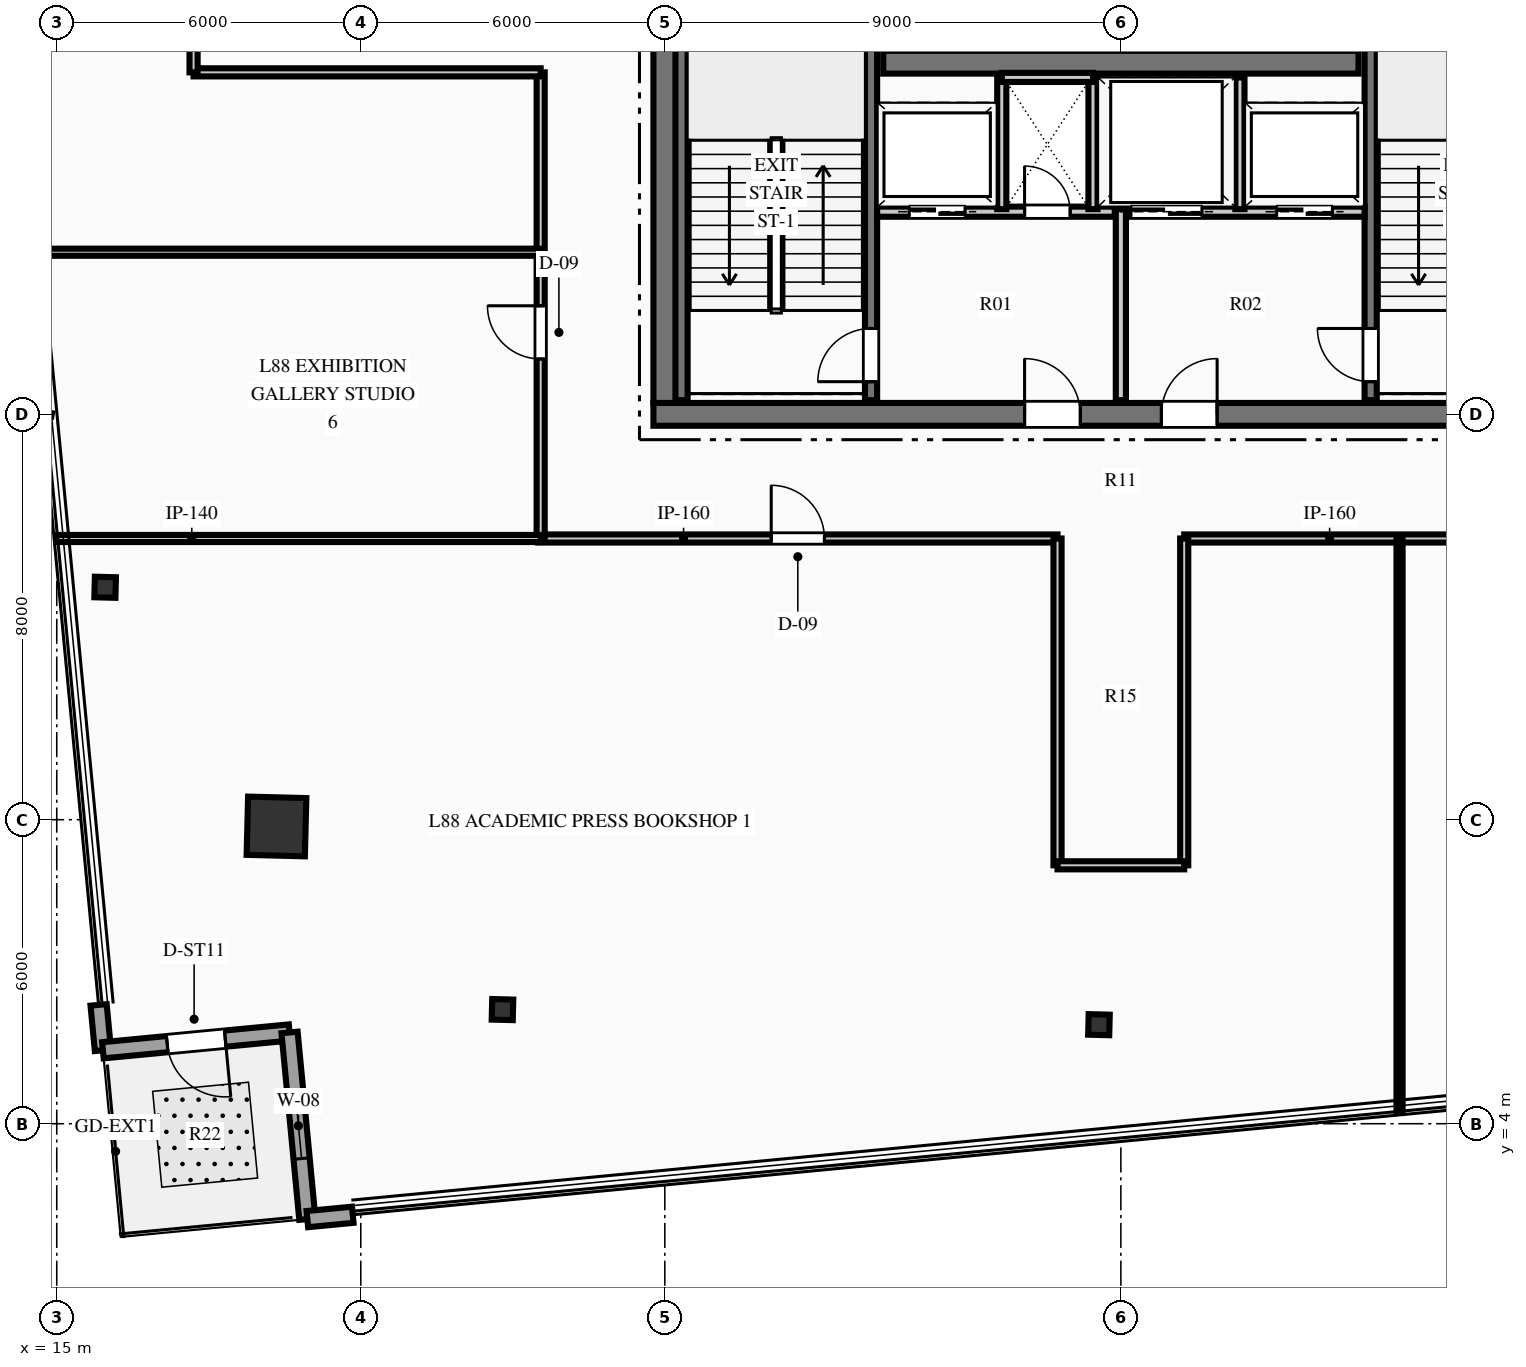
"""IFC4 building model, lengths in metres.
Left out: names, types, materials, properties, quantities, classifications, styles, units other than length and angle.
Written with IfcOpenShell. Run it as: python <this file> out.ifc"""

import sys

from ifc_helpers import new_model, si_unit, direction, frame, frame_2d, origin, origin_2d, place, context, subcontext, project, spatial, rectangle, hollow_rectangle, i_section, extrude, element, fill, save


model = new_model("IFC4")
c1 = context("Model", 3, precision=1e-05, world=origin(), true_north=direction((0.0, 1.0)))
c2 = subcontext(c1, "Body", "Model", "MODEL_VIEW")
j1 = project(units=[si_unit("LENGTHUNIT", "METRE"), si_unit("PLANEANGLEUNIT", "RADIAN")], contexts=[c1])
p1 = place(None, origin())
s1 = spatial("IfcSite", under=j1, at=p1, CompositionType="ELEMENT")
p2 = place(p1, origin())
s2 = spatial("IfcBuilding", under=s1, at=p2, CompositionType="ELEMENT")
p3 = place(p2, frame((0.0, 0.0, 347.7)))
s3 = spatial("IfcBuildingStorey", under=s2, at=p3, CompositionType="ELEMENT", Elevation=347.7)
p4 = place(p3, frame((26.775, 18.0, 0.0), z_axis=(0.0, 0.0, 1.0), x_axis=(1.0, 0.0, 0.0)))
e1 = element("IfcWall", 1, at=p4, inside=s3, PredefinedType="SHEAR", context=c2, shape_type="SweptSolid", body=[
    extrude(rectangle(XDim=18.45, YDim=0.45, at=frame_2d((9.225, 0.0))), origin(), (0.0, 0.0, 1.0), 4.5),
])
p5 = place(p4, frame((7.325, 0.0, 0.0)))
e2 = element("IfcOpeningElement", 2, at=p5, cuts=e1, PredefinedType="OPENING", context=c2, shape_type="SweptSolid", body=[
    extrude(rectangle(XDim=1.1, YDim=2.15, at=frame_2d((0.55, 1.075))), frame((0.0, 0.235, 0.0), z_axis=(0.0, -1.0, 0.0), x_axis=(1.0, 0.0, 0.0)), (0.0, 0.0, 1.0), 0.47),
])
p6 = place(p4, frame((10.025, 0.0, 0.0)))
e3 = element("IfcOpeningElement", 3, at=p6, cuts=e1, PredefinedType="OPENING", context=c2, shape_type="SweptSolid", body=[
    extrude(rectangle(XDim=1.1, YDim=2.15, at=frame_2d((0.55, 1.075))), frame((0.0, 0.235, 0.0), z_axis=(0.0, -1.0, 0.0), x_axis=(1.0, 0.0, 0.0)), (0.0, 0.0, 1.0), 0.47),
])
p7 = place(p3, frame((27.0, 18.225, 0.0), z_axis=(0.0, 0.0, 1.0), x_axis=(0.0, 1.0, 0.0)))
e4 = element("IfcWall", 4, at=p7, inside=s3, PredefinedType="SHEAR", context=c2, shape_type="SweptSolid", body=[
    extrude(rectangle(XDim=15.55, YDim=0.45, at=frame_2d((7.775, 0.0))), origin(), (0.0, 0.0, 1.0), 4.5),
])
p8 = place(p7, frame((10.015, 0.0, 0.0)))
e5 = element("IfcOpeningElement", 5, at=p8, cuts=e4, PredefinedType="OPENING", context=c2, shape_type="SweptSolid", body=[
    extrude(rectangle(XDim=1.4, YDim=2.2, at=frame_2d((0.7, 1.1))), frame((0.0, 0.235, 0.0), z_axis=(0.0, -1.0, 0.0), x_axis=(1.0, 0.0, 0.0)), (0.0, 0.0, 1.0), 0.47),
])
p9 = place(p3, frame((31.31, 24.95, 0.0), z_axis=(0.0, 0.0, 1.0), x_axis=(1.0, 0.0, 0.0)))
e6 = element("IfcWall", 6, at=p9, inside=s3, PredefinedType="SHEAR", context=c2, shape_type="SweptSolid", body=[
    extrude(rectangle(XDim=9.38, YDim=0.45, at=frame_2d((4.69, 0.0))), origin(), (0.0, 0.0, 1.0), 4.5),
])
p10 = place(p3, frame((31.07, 18.28, 0.0), z_axis=(0.0, 0.0, 1.0), x_axis=(0.0, 1.0, 0.0)))
e7 = element("IfcWall", 7, at=p10, inside=s3, PredefinedType="SHEAR", context=c2, shape_type="SweptSolid", body=[
    extrude(rectangle(XDim=8.26, YDim=0.24, at=frame_2d((4.13, 0.0))), origin(), (0.0, 0.0, 1.0), 4.5),
])
p11 = place(p10, frame((0.365, 0.0, 0.0)))
e8 = element("IfcOpeningElement", 8, at=p11, cuts=e7, PredefinedType="OPENING", context=c2, shape_type="SweptSolid", body=[
    extrude(rectangle(XDim=1.05, YDim=2.15, at=frame_2d((0.525, 1.075))), frame((0.0, 0.13, 0.0), z_axis=(0.0, -1.0, 0.0), x_axis=(1.0, 0.0, 0.0)), (0.0, 0.0, 1.0), 0.26),
])
p12 = place(p3, frame((27.33, 18.28, 0.0), z_axis=(0.0, 0.0, 1.0), x_axis=(0.0, 1.0, 0.0)))
e9 = element("IfcWall", 9, at=p12, inside=s3, PredefinedType="SHEAR", context=c2, shape_type="SweptSolid", body=[
    extrude(rectangle(XDim=8.26, YDim=0.24, at=frame_2d((4.13, 0.0))), origin(), (0.0, 0.0, 1.0), 4.5),
])
p13 = place(p3, frame((40.93, 18.28, 0.0), z_axis=(0.0, 0.0, 1.0), x_axis=(0.0, 1.0, 0.0)))
e10 = element("IfcWall", 10, at=p13, inside=s3, PredefinedType="SHEAR", context=c2, shape_type="SweptSolid", body=[
    extrude(rectangle(XDim=8.26, YDim=0.24, at=frame_2d((4.13, 0.0))), origin(), (0.0, 0.0, 1.0), 4.5),
])
p14 = place(p13, frame((0.365, 0.0, 0.0)))
e11 = element("IfcOpeningElement", 11, at=p14, cuts=e10, PredefinedType="OPENING", context=c2, shape_type="SweptSolid", body=[
    extrude(rectangle(XDim=1.05, YDim=2.15, at=frame_2d((0.525, 1.075))), frame((0.0, 0.13, 0.0), z_axis=(0.0, -1.0, 0.0), x_axis=(1.0, 0.0, 0.0)), (0.0, 0.0, 1.0), 0.26),
])
p15 = place(p3, frame((19.336, 9.866, 0.0), z_axis=(0.0, 0.0, 1.0), x_axis=(0.025304572866, 0.999679788028, 0.0)))
e12 = element("IfcColumn", 12, at=p15, inside=s3, PredefinedType="COLUMN", context=c2, shape_type="SweptSolid", body=[
    extrude(hollow_rectangle(XDim=1.15, YDim=1.15, WallThickness=0.05, at=origin_2d()), origin(), (0.0, 0.0, 1.0), 4.5),
])
for number, where, z_axis, x_axis in (
    (13, (15.955, 14.588, 0.0), (0.0, 0.0, 1.0), (0.025, 1.0, 0.0)),
    (14, (23.796, 6.252, 0.0), (0.0, 0.0, 1.0), (0.025, 1.0, 0.0)),
    (15, (35.568, 5.955, 0.0), (0.0, 0.0, 1.0), (0.025, 1.0, 0.0)),
):
    element("IfcColumn", number, at=place(p3, frame(where, z_axis=z_axis, x_axis=x_axis)), inside=s3, PredefinedType="COLUMN", context=c2, shape_type="SweptSolid", body=[
        extrude(i_section(OverallWidth=0.406, OverallDepth=0.416, WebThickness=0.03, FlangeThickness=0.048, at=origin_2d()), origin(), (0.0, 0.0, 1.0), 4.5),
    ])
p16 = place(p3, frame((15.911, 5.449, 0.0), z_axis=(0.0, 0.0, 1.0), x_axis=(-0.094962739077, 0.995480827634, 0.0)))
e16 = element("IfcWall", 16, at=p16, inside=s3, PredefinedType="STANDARD", context=c2, shape_type="SweptSolid", body=[
    extrude(rectangle(XDim=0.9, YDim=0.32, at=frame_2d((0.45, 0.0))), origin(), (0.0, 0.0, 1.0), 4.1),
])
p17 = place(p3, frame((19.594, 5.801, 0.0), z_axis=(0.0, 0.0, 1.0), x_axis=(-0.995481522985, -0.094955449528, 0.0)))
e17 = element("IfcWall", 17, at=p17, inside=s3, PredefinedType="STANDARD", context=c2, shape_type="SweptSolid", body=[
    extrude(rectangle(XDim=3.7, YDim=0.32, at=frame_2d((1.85, 0.0))), origin(), (0.0, 0.0, 1.0), 4.1),
])
p18 = place(p17, frame((1.275, 0.0, 0.0)))
e18 = element("IfcOpeningElement", 18, at=p18, cuts=e17, PredefinedType="OPENING", context=c2, shape_type="SweptSolid", body=[
    extrude(rectangle(XDim=1.15, YDim=2.2, at=frame_2d((0.575, 1.1))), frame((0.0, 0.17, 0.0), z_axis=(0.0, -1.0, 0.0), x_axis=(1.0, 0.0, 0.0)), (0.0, 0.0, 1.0), 0.34),
])
p19 = place(p3, frame((19.946, 2.117, 0.0), z_axis=(0.0, 0.0, 1.0), x_axis=(-0.095014599714, 0.995475879086, 0.0)))
e19 = element("IfcWall", 19, at=p19, inside=s3, PredefinedType="STANDARD", context=c2, shape_type="SweptSolid", body=[
    extrude(rectangle(XDim=3.7, YDim=0.32, at=frame_2d((1.85, 0.0))), origin(), (0.0, 0.0, 1.0), 4.1),
])
p20 = place(p19, frame((1.2, 0.0, 0.85)))
e20 = element("IfcOpeningElement", 20, at=p20, cuts=e19, PredefinedType="OPENING", context=c2, shape_type="SweptSolid", body=[
    extrude(rectangle(XDim=1.3, YDim=1.9, at=frame_2d((0.65, 0.95))), frame((0.0, 0.17, 0.0), z_axis=(0.0, -1.0, 0.0), x_axis=(1.0, 0.0, 0.0)), (0.0, 0.0, 1.0), 0.34),
])
p21 = place(p3, frame((20.842, 2.203, 0.0), z_axis=(0.0, 0.0, 1.0), x_axis=(-0.995455142934, -0.095231604026, 0.0)))
e21 = element("IfcWall", 21, at=p21, inside=s3, PredefinedType="STANDARD", context=c2, shape_type="SweptSolid", body=[
    extrude(rectangle(XDim=0.9, YDim=0.32, at=frame_2d((0.45, 0.0))), origin(), (0.0, 0.0, 1.0), 4.1),
])
p22 = place(p3, frame((36.0, 18.28, 0.0), z_axis=(0.0, 0.0, 1.0), x_axis=(0.0, 1.0, 0.0)))
e22 = element("IfcWall", 22, at=p22, inside=s3, PredefinedType="PARTITIONING", context=c2, shape_type="SweptSolid", body=[
    extrude(rectangle(XDim=3.77, YDim=0.2, at=frame_2d((1.885, 0.0))), origin(), (0.0, 0.0, 1.0), 4.1),
])
p23 = place(p3, frame((31.19, 22.0, 0.0), z_axis=(0.0, 0.0, 1.0), x_axis=(1.0, 0.0, 0.0)))
e23 = element("IfcWall", 23, at=p23, inside=s3, PredefinedType="PARTITIONING", context=c2, shape_type="SweptSolid", body=[
    extrude(rectangle(XDim=4.69, YDim=0.2, at=frame_2d((2.345, 0.0))), origin(), (0.0, 0.0, 1.0), 4.1),
])
p24 = place(p23, frame((2.91, 0.0, 0.0)))
e24 = element("IfcOpeningElement", 24, at=p24, cuts=e23, PredefinedType="OPENING", context=c2, shape_type="SweptSolid", body=[
    extrude(rectangle(XDim=0.9, YDim=2.15, at=frame_2d((0.45, 1.075))), frame((0.0, 0.11, 0.0), z_axis=(0.0, -1.0, 0.0), x_axis=(1.0, 0.0, 0.0)), (0.0, 0.0, 1.0), 0.22),
])
p25 = place(p23, frame((0.635, 0.0, 0.0)))
e25 = element("IfcOpeningElement", 25, at=p25, cuts=e23, PredefinedType="OPENING", context=c2, shape_type="SweptSolid", body=[
    extrude(rectangle(XDim=1.1, YDim=2.15, at=frame_2d((0.55, 1.075))), frame((0.0, 0.11, 0.0), z_axis=(0.0, -1.0, 0.0), x_axis=(1.0, 0.0, 0.0)), (0.0, 0.0, 1.0), 0.22),
])
p26 = place(p3, frame((36.12, 22.0, 0.0), z_axis=(0.0, 0.0, 1.0), x_axis=(1.0, 0.0, 0.0)))
e26 = element("IfcWall", 26, at=p26, inside=s3, PredefinedType="PARTITIONING", context=c2, shape_type="SweptSolid", body=[
    extrude(rectangle(XDim=4.69, YDim=0.2, at=frame_2d((2.345, 0.0))), origin(), (0.0, 0.0, 1.0), 4.1),
])
p27 = place(p26, frame((2.955, 0.0, 0.0)))
e27 = element("IfcOpeningElement", 27, at=p27, cuts=e26, PredefinedType="OPENING", context=c2, shape_type="SweptSolid", body=[
    extrude(rectangle(XDim=1.1, YDim=2.15, at=frame_2d((0.55, 1.075))), frame((0.0, 0.11, 0.0), z_axis=(0.0, -1.0, 0.0), x_axis=(1.0, 0.0, 0.0)), (0.0, 0.0, 1.0), 0.22),
])
p28 = place(p26, frame((0.08, 0.0, 0.0)))
e28 = element("IfcOpeningElement", 28, at=p28, cuts=e26, PredefinedType="OPENING", context=c2, shape_type="SweptSolid", body=[
    extrude(rectangle(XDim=1.4, YDim=2.2, at=frame_2d((0.7, 1.1))), frame((0.0, 0.11, 0.0), z_axis=(0.0, -1.0, 0.0), x_axis=(1.0, 0.0, 0.0)), (0.0, 0.0, 1.0), 0.22),
])
for number, where, z_axis, x_axis in (
    (29, (33.65, 22.05, 0.0), (0.0, 0.0, 1.0), (0.0, 1.0, 0.0)),
    (30, (35.45, 22.05, 0.0), (0.0, 0.0, 1.0), (0.0, 1.0, 0.0)),
):
    element("IfcWall", number, at=place(p3, frame(where, z_axis=z_axis, x_axis=x_axis)), inside=s3, PredefinedType="PARTITIONING", context=c2, shape_type="SweptSolid", body=[
        extrude(rectangle(XDim=2.6, YDim=0.18, at=frame_2d((1.3, 0.0))), origin(), (0.0, 0.0, 1.0), 4.1),
    ])
p29 = place(p3, frame((33.65, 24.65, 0.0), z_axis=(0.0, 0.0, 1.0), x_axis=(1.0, 0.0, 0.0)))
e31 = element("IfcWall", 31, at=p29, inside=s3, PredefinedType="PARTITIONING", context=c2, shape_type="SweptSolid", body=[
    extrude(rectangle(XDim=1.8, YDim=0.18, at=frame_2d((0.9, 0.0))), origin(), (0.0, 0.0, 1.0), 4.1),
])
p30 = place(p3, frame((38.35, 22.05, 0.0), z_axis=(0.0, 0.0, 1.0), x_axis=(0.0, 1.0, 0.0)))
e32 = element("IfcWall", 32, at=p30, inside=s3, PredefinedType="PARTITIONING", context=c2, shape_type="SweptSolid", body=[
    extrude(rectangle(XDim=2.6, YDim=0.18, at=frame_2d((1.3, 0.0))), origin(), (0.0, 0.0, 1.0), 4.1),
])
p31 = place(p3, frame((24.5, 15.55, 0.0), z_axis=(0.0, 0.0, 1.0), x_axis=(1.0, 0.0, 0.0)))
e33 = element("IfcWall", 33, at=p31, inside=s3, PredefinedType="PARTITIONING", context=c2, shape_type="SweptSolid", body=[
    extrude(rectangle(XDim=10.25, YDim=0.16, at=frame_2d((5.125, 0.0))), origin(), (0.0, 0.0, 1.0), 4.1),
])
p32 = place(p31, frame((4.6, 0.0, 0.0)))
e34 = element("IfcOpeningElement", 34, at=p32, cuts=e33, PredefinedType="OPENING", context=c2, shape_type="SweptSolid", body=[
    extrude(rectangle(XDim=1.05, YDim=2.15, at=frame_2d((0.525, 1.075))), frame((0.0, 0.09, 0.0), z_axis=(0.0, -1.0, 0.0), x_axis=(1.0, 0.0, 0.0)), (0.0, 0.0, 1.0), 0.18),
])
p33 = place(p3, frame((37.25, 15.55, 0.0), z_axis=(0.0, 0.0, 1.0), x_axis=(1.0, 0.0, 0.0)))
e35 = element("IfcWall", 35, at=p33, inside=s3, PredefinedType="PARTITIONING", context=c2, shape_type="SweptSolid", body=[
    extrude(rectangle(XDim=10.25, YDim=0.16, at=frame_2d((5.125, 0.0))), origin(), (0.0, 0.0, 1.0), 4.1),
])
p34 = place(p33, frame((5.419, 0.0, 0.0)))
e36 = element("IfcOpeningElement", 36, at=p34, cuts=e35, PredefinedType="OPENING", context=c2, shape_type="SweptSolid", body=[
    extrude(rectangle(XDim=1.05, YDim=2.15, at=frame_2d((0.525, 1.075))), frame((0.0, 0.09, 0.0), z_axis=(0.0, -1.0, 0.0), x_axis=(1.0, 0.0, 0.0)), (0.0, 0.0, 1.0), 0.18),
])
p35 = place(p3, frame((24.55, 15.55, 0.0), z_axis=(0.0, 0.0, 1.0), x_axis=(0.0, 1.0, 0.0)))
e37 = element("IfcWall", 37, at=p35, inside=s3, PredefinedType="PARTITIONING", context=c2, shape_type="SweptSolid", body=[
    extrude(rectangle(XDim=9.2, YDim=0.16, at=frame_2d((4.6, 0.0))), origin(), (0.0, 0.0, 1.0), 4.1),
])
p36 = place(p35, frame((3.543, 0.0, 0.0)))
e38 = element("IfcOpeningElement", 38, at=p36, cuts=e37, PredefinedType="OPENING", context=c2, shape_type="SweptSolid", body=[
    extrude(rectangle(XDim=1.05, YDim=2.15, at=frame_2d((0.525, 1.075))), frame((0.0, 0.09, 0.0), z_axis=(0.0, -1.0, 0.0), x_axis=(1.0, 0.0, 0.0)), (0.0, 0.0, 1.0), 0.18),
])
for number, where, z_axis, x_axis in (
    (39, (34.75, 9.1, 0.0), (0.0, 0.0, 1.0), (0.0, 1.0, 0.0)),
    (40, (37.25, 9.1, 0.0), (0.0, 0.0, 1.0), (0.0, 1.0, 0.0)),
):
    element("IfcWall", number, at=place(p3, frame(where, z_axis=z_axis, x_axis=x_axis)), inside=s3, PredefinedType="PARTITIONING", context=c2, shape_type="SweptSolid", body=[
        extrude(rectangle(XDim=6.45, YDim=0.16, at=frame_2d((3.225, 0.0))), origin(), (0.0, 0.0, 1.0), 4.1),
    ])
p37 = place(p3, frame((34.75, 9.1, 0.0), z_axis=(0.0, 0.0, 1.0), x_axis=(1.0, 0.0, 0.0)))
e41 = element("IfcWall", 41, at=p37, inside=s3, PredefinedType="PARTITIONING", context=c2, shape_type="SweptSolid", body=[
    extrude(rectangle(XDim=2.5, YDim=0.16, at=frame_2d((1.25, 0.0))), origin(), (0.0, 0.0, 1.0), 4.1),
])
p38 = place(p3, frame((17.7, 24.75, 0.0), z_axis=(0.0, 0.0, 1.0), x_axis=(1.0, 0.0, 0.0)))
e42 = element("IfcWall", 42, at=p38, inside=s3, PredefinedType="PARTITIONING", context=c2, shape_type="SweptSolid", body=[
    extrude(rectangle(XDim=6.85, YDim=0.16, at=frame_2d((3.425, 0.0))), origin(), (0.0, 0.0, 1.0), 4.1),
])
p39 = place(p3, frame((17.7, 24.75, 0.0), z_axis=(0.0, 0.0, 1.0), x_axis=(0.0, 1.0, 0.0)))
e43 = element("IfcWall", 43, at=p39, inside=s3, PredefinedType="PARTITIONING", context=c2, shape_type="SweptSolid", body=[
    extrude(rectangle(XDim=2.5, YDim=0.16, at=frame_2d((1.25, 0.0))), origin(), (0.0, 0.0, 1.0), 4.1),
])
p40 = place(p3, frame((14.988, 15.55, 0.0), z_axis=(0.0, 0.0, 1.0), x_axis=(1.0, 0.0, 0.0)))
e44 = element("IfcWall", 44, at=p40, inside=s3, PredefinedType="PARTITIONING", context=c2, shape_type="SweptSolid", body=[
    extrude(rectangle(XDim=9.562, YDim=0.14, at=frame_2d((4.781, 0.0))), origin(), (0.0, 0.0, 1.0), 3.478),
])
p41 = place(p3, frame((41.5, 4.214, 0.0), z_axis=(0.0, 0.0, 1.0), x_axis=(0.0, 1.0, 0.0)))
e45 = element("IfcWall", 45, at=p41, inside=s3, PredefinedType="PARTITIONING", context=c2, shape_type="SweptSolid", body=[
    extrude(rectangle(XDim=11.336, YDim=0.12, at=frame_2d((5.668, 0.0))), origin(), (0.0, 0.0, 1.0), 4.1),
])
p42 = place(p3, frame((14.448, 21.2, 0.0), z_axis=(0.0, 0.0, 1.0), x_axis=(1.0, 0.0, 0.0)))
e46 = element("IfcWall", 46, at=p42, inside=s3, PredefinedType="PARTITIONING", context=c2, shape_type="SweptSolid", body=[
    extrude(rectangle(XDim=10.102, YDim=0.14, at=frame_2d((5.051, 0.0))), origin(), (0.0, 0.0, 1.0), 4.1),
])
p43 = place(p18, origin())
e47 = element("IfcDoor", 47, at=p43, inside=s3, OperationType="SINGLE_SWING_LEFT", PredefinedType="DOOR", context=c2, shape_type="SweptSolid", body=[
    extrude(rectangle(XDim=1.15, YDim=2.2, at=frame_2d((0.575, 1.1))), frame((0.0, 0.025, 0.0), z_axis=(0.0, -1.0, 0.0), x_axis=(1.0, 0.0, 0.0)), (0.0, 0.0, 1.0), 0.05),
])
fill(e18, e47)
p44 = place(p20, origin())
e48 = element("IfcWindow", 48, at=p44, inside=s3, PartitioningType="SINGLE_PANEL", PredefinedType="WINDOW", context=c2, shape_type="SweptSolid", body=[
    extrude(rectangle(XDim=1.3, YDim=1.9, at=frame_2d((0.65, 0.95))), frame((0.0, 0.03, 0.0), z_axis=(0.0, -1.0, 0.0), x_axis=(1.0, 0.0, 0.0)), (0.0, 0.0, 1.0), 0.06),
])
fill(e20, e48)
p45 = place(p11, origin())
e49 = element("IfcDoor", 49, at=p45, inside=s3, OperationType="SINGLE_SWING_LEFT", PredefinedType="DOOR", context=c2, shape_type="SweptSolid", body=[
    extrude(rectangle(XDim=1.05, YDim=2.15, at=frame_2d((0.525, 1.075))), frame((0.0, 0.025, 0.0), z_axis=(0.0, -1.0, 0.0), x_axis=(1.0, 0.0, 0.0)), (0.0, 0.0, 1.0), 0.05),
])
fill(e8, e49)
p46 = place(p14, origin())
e50 = element("IfcDoor", 50, at=p46, inside=s3, OperationType="SINGLE_SWING_RIGHT", PredefinedType="DOOR", context=c2, shape_type="SweptSolid", body=[
    extrude(rectangle(XDim=1.05, YDim=2.15, at=frame_2d((0.525, 1.075))), frame((0.0, 0.025, 0.0), z_axis=(0.0, -1.0, 0.0), x_axis=(1.0, 0.0, 0.0)), (0.0, 0.0, 1.0), 0.05),
])
fill(e11, e50)
p47 = place(p5, origin())
e51 = element("IfcDoor", 51, at=p47, inside=s3, OperationType="SINGLE_SWING_LEFT", PredefinedType="DOOR", context=c2, shape_type="SweptSolid", body=[
    extrude(rectangle(XDim=1.1, YDim=2.15, at=frame_2d((0.55, 1.075))), frame((0.0, 0.025, 0.0), z_axis=(0.0, -1.0, 0.0), x_axis=(1.0, 0.0, 0.0)), (0.0, 0.0, 1.0), 0.05),
])
fill(e2, e51)
p48 = place(p6, origin())
e52 = element("IfcDoor", 52, at=p48, inside=s3, OperationType="SINGLE_SWING_RIGHT", PredefinedType="DOOR", context=c2, shape_type="SweptSolid", body=[
    extrude(rectangle(XDim=1.1, YDim=2.15, at=frame_2d((0.55, 1.075))), frame((0.0, 0.025, 0.0), z_axis=(0.0, -1.0, 0.0), x_axis=(1.0, 0.0, 0.0)), (0.0, 0.0, 1.0), 0.05),
])
fill(e3, e52)
p49 = place(p24, origin())
e53 = element("IfcDoor", 53, at=p49, inside=s3, OperationType="SINGLE_SWING_LEFT", PredefinedType="DOOR", context=c2, shape_type="SweptSolid", body=[
    extrude(rectangle(XDim=0.9, YDim=2.15, at=frame_2d((0.45, 1.075))), frame((0.0, 0.025, 0.0), z_axis=(0.0, -1.0, 0.0), x_axis=(1.0, 0.0, 0.0)), (0.0, 0.0, 1.0), 0.05),
])
fill(e24, e53)
p50 = place(p32, origin())
e54 = element("IfcDoor", 54, at=p50, inside=s3, OperationType="SINGLE_SWING_LEFT", PredefinedType="DOOR", context=c2, shape_type="SweptSolid", body=[
    extrude(rectangle(XDim=1.05, YDim=2.15, at=frame_2d((0.525, 1.075))), frame((0.0, 0.025, 0.0), z_axis=(0.0, -1.0, 0.0), x_axis=(1.0, 0.0, 0.0)), (0.0, 0.0, 1.0), 0.05),
])
fill(e34, e54)
p51 = place(p36, origin())
e55 = element("IfcDoor", 55, at=p51, inside=s3, OperationType="SINGLE_SWING_RIGHT", PredefinedType="DOOR", context=c2, shape_type="SweptSolid", body=[
    extrude(rectangle(XDim=1.05, YDim=2.15, at=frame_2d((0.525, 1.075))), frame((0.0, 0.025, 0.0), z_axis=(0.0, -1.0, 0.0), x_axis=(1.0, 0.0, 0.0)), (0.0, 0.0, 1.0), 0.05),
])
fill(e38, e55)
p52 = place(p25, origin())
e56 = element("IfcDoor", 56, at=p52, inside=s3, OperationType="SLIDING_TO_LEFT", PredefinedType="DOOR", context=c2, shape_type="SweptSolid", body=[
    extrude(rectangle(XDim=1.1, YDim=2.15, at=frame_2d((0.55, 1.075))), frame((0.0, 0.025, 0.0), z_axis=(0.0, -1.0, 0.0), x_axis=(1.0, 0.0, 0.0)), (0.0, 0.0, 1.0), 0.05),
])
fill(e25, e56)
p53 = place(p27, origin())
e57 = element("IfcDoor", 57, at=p53, inside=s3, OperationType="SLIDING_TO_LEFT", PredefinedType="DOOR", context=c2, shape_type="SweptSolid", body=[
    extrude(rectangle(XDim=1.1, YDim=2.15, at=frame_2d((0.55, 1.075))), frame((0.0, 0.025, 0.0), z_axis=(0.0, -1.0, 0.0), x_axis=(1.0, 0.0, 0.0)), (0.0, 0.0, 1.0), 0.05),
])
fill(e27, e57)
p54 = place(p28, origin())
e58 = element("IfcDoor", 58, at=p54, inside=s3, OperationType="SLIDING_TO_LEFT", PredefinedType="DOOR", context=c2, shape_type="SweptSolid", body=[
    extrude(rectangle(XDim=1.4, YDim=2.2, at=frame_2d((0.7, 1.1))), frame((0.0, 0.025, 0.0), z_axis=(0.0, -1.0, 0.0), x_axis=(1.0, 0.0, 0.0)), (0.0, 0.0, 1.0), 0.05),
])
fill(e28, e58)
save(model, sys.argv[1])
